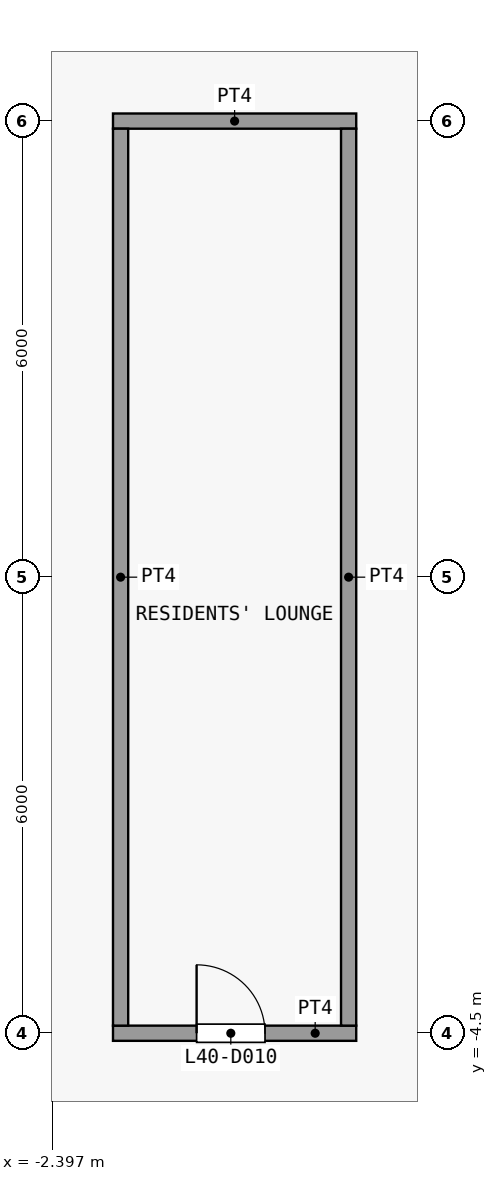
"""IFC4 building model, lengths in metres.
Left out: names, types, materials, properties, quantities, classifications, styles, units other than length and angle.
Written with IfcOpenShell. Run it as: python <this file> out.ifc"""

import sys

from ifc_helpers import new_model, si_unit, direction, frame, frame_2d, origin, place, context, subcontext, project, spatial, rectangle, extrude, element, fill, save


model = new_model("IFC4")
c1 = context("Model", 3, precision=1e-05, world=origin(), true_north=direction((0.0, 1.0)))
c2 = subcontext(c1, "Body", "Model", "MODEL_VIEW")
j1 = project(units=[si_unit("LENGTHUNIT", "METRE"), si_unit("PLANEANGLEUNIT", "RADIAN")], contexts=[c1])
p1 = place(None, origin())
s1 = spatial("IfcSite", under=j1, at=p1, CompositionType="ELEMENT")
p2 = place(p1, origin())
s2 = spatial("IfcBuilding", under=s1, at=p2, CompositionType="ELEMENT")
p3 = place(p2, frame((0.0, 0.0, 163.7)))
s3 = spatial("IfcBuildingStorey", under=s2, at=p3, CompositionType="ELEMENT", Elevation=163.7)
p4 = place(p3, frame((-1.6, -4.5, 0.0), z_axis=(0.0, 0.0, 1.0), x_axis=(1.0, 0.0, 0.0)))
e1 = element("IfcWall", 1, at=p4, inside=s3, PredefinedType="PARTITIONING", context=c2, shape_type="SweptSolid", body=[
    extrude(rectangle(XDim=3.2, YDim=0.2, at=frame_2d((1.6, 0.0))), origin(), (0.0, 0.0, 1.0), 3.3),
])
p5 = place(p4, frame((1.1, 0.0, 0.0)))
e2 = element("IfcOpeningElement", 2, at=p5, cuts=e1, PredefinedType="OPENING", context=c2, shape_type="SweptSolid", body=[
    extrude(rectangle(XDim=0.9, YDim=2.1, at=frame_2d((0.45, 1.05))), frame((0.0, 0.11, 0.0), z_axis=(0.0, -1.0, 0.0), x_axis=(1.0, 0.0, 0.0)), (0.0, 0.0, 1.0), 0.22),
])
p6 = place(p3, frame((-1.6, 7.5, 0.0), z_axis=(0.0, 0.0, 1.0), x_axis=(1.0, 0.0, 0.0)))
e3 = element("IfcWall", 3, at=p6, inside=s3, PredefinedType="PARTITIONING", context=c2, shape_type="SweptSolid", body=[
    extrude(rectangle(XDim=3.2, YDim=0.2, at=frame_2d((1.6, 0.0))), origin(), (0.0, 0.0, 1.0), 3.3),
])
for number, where, z_axis, x_axis in (
    (4, (-1.5, -4.4, 0.0), (0.0, 0.0, 1.0), (0.0, 1.0, 0.0)),
    (5, (1.5, -4.4, 0.0), (0.0, 0.0, 1.0), (0.0, 1.0, 0.0)),
):
    element("IfcWall", number, at=place(p3, frame(where, z_axis=z_axis, x_axis=x_axis)), inside=s3, PredefinedType="PARTITIONING", context=c2, shape_type="SweptSolid", body=[
        extrude(rectangle(XDim=11.8, YDim=0.2, at=frame_2d((5.9, 0.0))), origin(), (0.0, 0.0, 1.0), 3.3),
    ])
p7 = place(p5, origin())
e6 = element("IfcDoor", 6, at=p7, inside=s3, OperationType="SINGLE_SWING_RIGHT", PredefinedType="DOOR", context=c2, shape_type="SweptSolid", body=[
    extrude(rectangle(XDim=0.9, YDim=2.1, at=frame_2d((0.45, 1.05))), frame((0.0, 0.025, 0.0), z_axis=(0.0, -1.0, 0.0), x_axis=(1.0, 0.0, 0.0)), (0.0, 0.0, 1.0), 0.05),
])
fill(e2, e6)
save(model, sys.argv[1])
